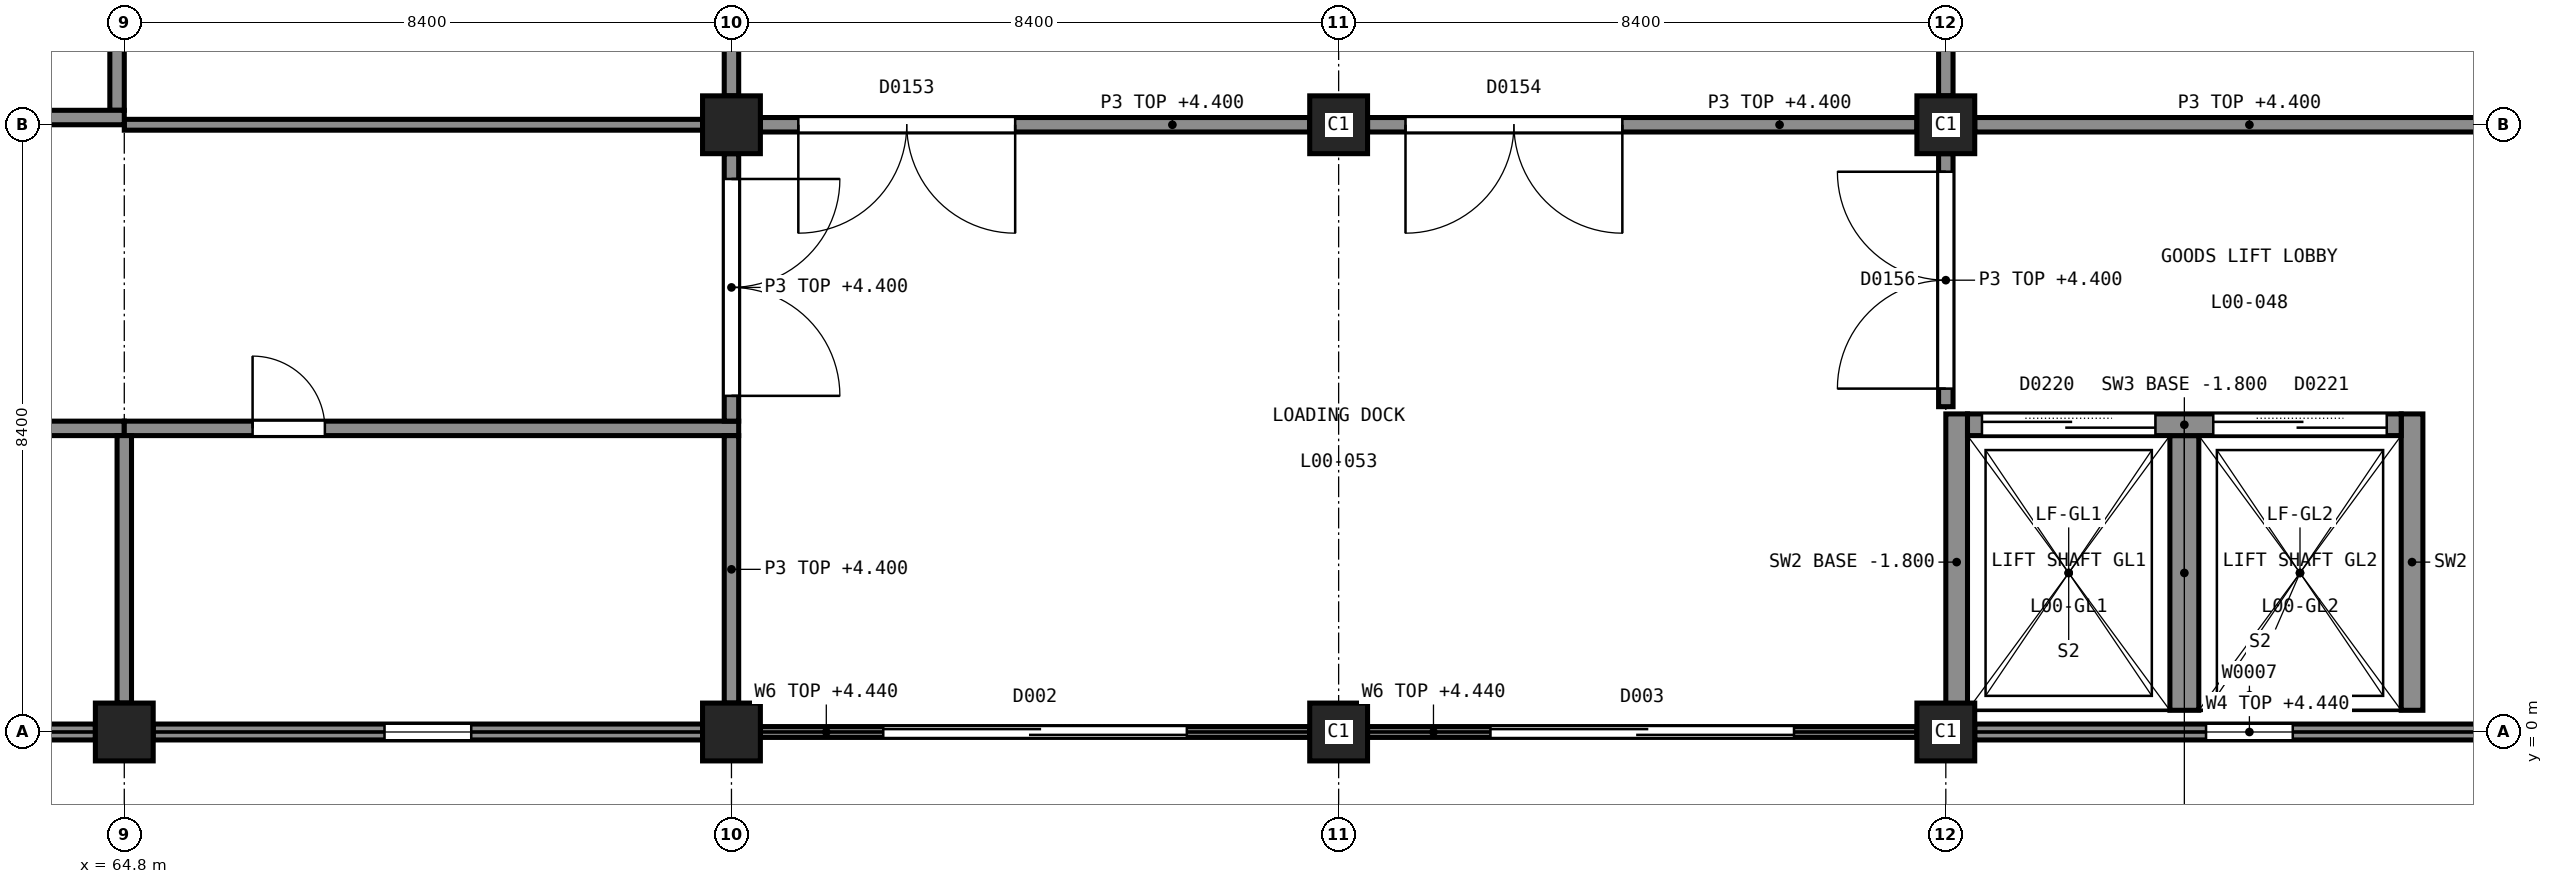
"""IFC4 building model, lengths in metres.
Left out: names, types, materials, properties, quantities, classifications, styles, units other than length and angle.
Written with IfcOpenShell. Run it as: python <this file> out.ifc"""

import sys

from ifc_helpers import new_model, si_unit, direction, frame, frame_2d, origin, origin_2d, place, context, subcontext, project, spatial, rectangle, extrude, element, fill, save


model = new_model("IFC4")
c1 = context("Model", 3, precision=1e-05, world=origin(), true_north=direction((0.0, 1.0)))
c2 = subcontext(c1, "Body", "Model", "MODEL_VIEW")
j1 = project(units=[si_unit("LENGTHUNIT", "METRE"), si_unit("PLANEANGLEUNIT", "RADIAN")], contexts=[c1])
p1 = place(None, origin())
s1 = spatial("IfcSite", under=j1, at=p1, CompositionType="ELEMENT")
p2 = place(p1, origin())
s2 = spatial("IfcBuilding", under=s1, at=p2, CompositionType="ELEMENT")
p3 = place(p2, origin())
s3 = spatial("IfcBuildingStorey", under=s2, at=p3, CompositionType="ELEMENT", Elevation=0.0)
p4 = place(p3, frame((56.4, 8.5, -1.8), z_axis=(0.0, 0.0, 1.0), x_axis=(1.0, 0.0, 0.0)))
e1 = element("IfcWall", 1, at=p4, inside=s3, PredefinedType="SHEAR", context=c2, shape_type="SweptSolid", body=[
    extrude(rectangle(XDim=8.4, YDim=0.2, at=frame_2d((4.2, 0.0))), origin(), (0.0, 0.0, 1.0), 7.3),
])
p5 = place(p4, frame((3.3, 0.0, 1.8)))
e2 = element("IfcOpeningElement", 2, at=p5, cuts=e1, PredefinedType="OPENING", context=c2, shape_type="SweptSolid", body=[
    extrude(rectangle(XDim=1.8, YDim=2.1, at=frame_2d((0.9, 1.05))), frame((0.0, 0.11, 0.0), z_axis=(0.0, -1.0, 0.0), x_axis=(1.0, 0.0, 0.0)), (0.0, 0.0, 1.0), 0.22),
])
p6 = place(p3, frame((64.7, 8.6, -1.8), z_axis=(0.0, 0.0, 1.0), x_axis=(0.0, 1.0, 0.0)))
e3 = element("IfcWall", 3, at=p6, inside=s3, PredefinedType="SHEAR", context=c2, shape_type="SweptSolid", body=[
    extrude(rectangle(XDim=8.0, YDim=0.2, at=frame_2d((4.0, 0.0))), origin(), (0.0, 0.0, 1.0), 7.3),
])
for number, where, z_axis, x_axis in (
    (4, (90.15, 0.3, -1.8), (0.0, 0.0, 1.0), (0.0, 1.0, 0.0)),
    (5, (96.45, 0.3, -1.8), (0.0, 0.0, 1.0), (0.0, 1.0, 0.0)),
):
    element("IfcWall", number, at=place(p3, frame(where, z_axis=z_axis, x_axis=x_axis)), inside=s3, PredefinedType="SHEAR", context=c2, shape_type="SweptSolid", body=[
        extrude(rectangle(XDim=4.1, YDim=0.3, at=frame_2d((2.05, 0.0))), origin(), (0.0, 0.0, 1.0), 7.3),
    ])
p7 = place(p3, frame((90.3, 4.25, -1.8), z_axis=(0.0, 0.0, 1.0), x_axis=(1.0, 0.0, 0.0)))
e6 = element("IfcWall", 6, at=p7, inside=s3, PredefinedType="SHEAR", context=c2, shape_type="SweptSolid", body=[
    extrude(rectangle(XDim=6.0, YDim=0.3, at=frame_2d((3.0, 0.0))), origin(), (0.0, 0.0, 1.0), 7.3),
])
p8 = place(p7, frame((0.2, 0.0, 1.8)))
e7 = element("IfcOpeningElement", 7, at=p8, cuts=e6, PredefinedType="OPENING", context=c2, shape_type="SweptSolid", body=[
    extrude(rectangle(XDim=2.4, YDim=2.4, at=frame_2d((1.2, 1.2))), frame((0.0, 0.16, 0.0), z_axis=(0.0, -1.0, 0.0), x_axis=(1.0, 0.0, 0.0)), (0.0, 0.0, 1.0), 0.32),
])
p9 = place(p7, frame((3.4, 0.0, 1.8)))
e8 = element("IfcOpeningElement", 8, at=p9, cuts=e6, PredefinedType="OPENING", context=c2, shape_type="SweptSolid", body=[
    extrude(rectangle(XDim=2.4, YDim=2.4, at=frame_2d((1.2, 1.2))), frame((0.0, 0.16, 0.0), z_axis=(0.0, -1.0, 0.0), x_axis=(1.0, 0.0, 0.0)), (0.0, 0.0, 1.0), 0.32),
])
p10 = place(p3, frame((93.3, 0.3, -1.8), z_axis=(0.0, 0.0, 1.0), x_axis=(0.0, 1.0, 0.0)))
e9 = element("IfcWall", 9, at=p10, inside=s3, PredefinedType="SHEAR", context=c2, shape_type="SweptSolid", body=[
    extrude(rectangle(XDim=3.8, YDim=0.4, at=frame_2d((1.9, 0.0))), origin(), (0.0, 0.0, 1.0), 7.3),
])
for number, where, z_axis, x_axis in (
    (10, (64.8, 0.0, -0.3), (0.0, 0.0, 1.0), (1.0, 0.0, 0.0)),
    (11, (73.2, 0.0, -0.3), (0.0, 0.0, 1.0), (1.0, 0.0, 0.0)),
    (12, (73.2, 8.4, -0.3), (0.0, 0.0, 1.0), (1.0, 0.0, 0.0)),
    (13, (81.6, 0.0, -0.3), (0.0, 0.0, 1.0), (1.0, 0.0, 0.0)),
    (14, (81.6, 8.4, -0.3), (0.0, 0.0, 1.0), (1.0, 0.0, 0.0)),
    (15, (90.0, 0.0, -0.3), (0.0, 0.0, 1.0), (1.0, 0.0, 0.0)),
    (16, (90.0, 8.4, -0.3), (0.0, 0.0, 1.0), (1.0, 0.0, 0.0)),
):
    element("IfcColumn", number, at=place(p3, frame(where, z_axis=z_axis, x_axis=x_axis)), inside=s3, PredefinedType="COLUMN", context=c2, shape_type="SweptSolid", body=[
        extrude(rectangle(XDim=0.8, YDim=0.8, at=origin_2d()), origin(), (0.0, 0.0, 1.0), 5.8),
    ])
p11 = place(p3, frame((56.8, 0.0, 0.0), z_axis=(0.0, 0.0, 1.0), x_axis=(1.0, 0.0, 0.0)))
e17 = element("IfcWall", 17, at=p11, inside=s3, PredefinedType="SOLIDWALL", context=c2, shape_type="SweptSolid", body=[
    extrude(rectangle(XDim=7.6, YDim=0.22, at=frame_2d((3.8, 0.0))), origin(), (0.0, 0.0, 1.0), 4.44),
])
p12 = place(p11, frame((3.2, 0.0, 2.1)))
e18 = element("IfcOpeningElement", 18, at=p12, cuts=e17, PredefinedType="OPENING", context=c2, shape_type="SweptSolid", body=[
    extrude(rectangle(XDim=1.2, YDim=0.6, at=frame_2d((0.6, 0.3))), frame((0.0, 0.12, 0.0), z_axis=(0.0, -1.0, 0.0), x_axis=(1.0, 0.0, 0.0)), (0.0, 0.0, 1.0), 0.24),
])
p13 = place(p3, frame((65.2, 0.0, 0.0), z_axis=(0.0, 0.0, 1.0), x_axis=(1.0, 0.0, 0.0)))
e19 = element("IfcWall", 19, at=p13, inside=s3, PredefinedType="SOLIDWALL", context=c2, shape_type="SweptSolid", body=[
    extrude(rectangle(XDim=7.6, YDim=0.22, at=frame_2d((3.8, 0.0))), origin(), (0.0, 0.0, 1.0), 4.44),
])
p14 = place(p13, frame((3.2, 0.0, 2.1)))
e20 = element("IfcOpeningElement", 20, at=p14, cuts=e19, PredefinedType="OPENING", context=c2, shape_type="SweptSolid", body=[
    extrude(rectangle(XDim=1.2, YDim=0.6, at=frame_2d((0.6, 0.3))), frame((0.0, 0.12, 0.0), z_axis=(0.0, -1.0, 0.0), x_axis=(1.0, 0.0, 0.0)), (0.0, 0.0, 1.0), 0.24),
])
p15 = place(p3, frame((73.6, 0.0, 0.0), z_axis=(0.0, 0.0, 1.0), x_axis=(1.0, 0.0, 0.0)))
e21 = element("IfcWall", 21, at=p15, inside=s3, PredefinedType="ELEMENTEDWALL", context=c2, shape_type="SweptSolid", body=[
    extrude(rectangle(XDim=7.6, YDim=0.15, at=frame_2d((3.8, 0.0))), origin(), (0.0, 0.0, 1.0), 4.44),
])
p16 = place(p15, frame((1.7, 0.0, 0.0)))
e22 = element("IfcOpeningElement", 22, at=p16, cuts=e21, PredefinedType="OPENING", context=c2, shape_type="SweptSolid", body=[
    extrude(rectangle(XDim=4.2, YDim=4.34, at=frame_2d((2.1, 2.17))), frame((0.0, 0.085, 0.0), z_axis=(0.0, -1.0, 0.0), x_axis=(1.0, 0.0, 0.0)), (0.0, 0.0, 1.0), 0.17),
])
p17 = place(p3, frame((82.0, 0.0, 0.0), z_axis=(0.0, 0.0, 1.0), x_axis=(1.0, 0.0, 0.0)))
e23 = element("IfcWall", 23, at=p17, inside=s3, PredefinedType="ELEMENTEDWALL", context=c2, shape_type="SweptSolid", body=[
    extrude(rectangle(XDim=7.6, YDim=0.15, at=frame_2d((3.8, 0.0))), origin(), (0.0, 0.0, 1.0), 4.44),
])
p18 = place(p17, frame((1.7, 0.0, 0.0)))
e24 = element("IfcOpeningElement", 24, at=p18, cuts=e23, PredefinedType="OPENING", context=c2, shape_type="SweptSolid", body=[
    extrude(rectangle(XDim=4.2, YDim=4.34, at=frame_2d((2.1, 2.17))), frame((0.0, 0.085, 0.0), z_axis=(0.0, -1.0, 0.0), x_axis=(1.0, 0.0, 0.0)), (0.0, 0.0, 1.0), 0.17),
])
p19 = place(p3, frame((90.4, 0.0, 0.0), z_axis=(0.0, 0.0, 1.0), x_axis=(1.0, 0.0, 0.0)))
e25 = element("IfcWall", 25, at=p19, inside=s3, PredefinedType="SOLIDWALL", context=c2, shape_type="SweptSolid", body=[
    extrude(rectangle(XDim=7.6, YDim=0.22, at=frame_2d((3.8, 0.0))), origin(), (0.0, 0.0, 1.0), 4.44),
])
p20 = place(p19, frame((3.2, 0.0, 2.1)))
e26 = element("IfcOpeningElement", 26, at=p20, cuts=e25, PredefinedType="OPENING", context=c2, shape_type="SweptSolid", body=[
    extrude(rectangle(XDim=1.2, YDim=0.6, at=frame_2d((0.6, 0.3))), frame((0.0, 0.12, 0.0), z_axis=(0.0, -1.0, 0.0), x_axis=(1.0, 0.0, 0.0)), (0.0, 0.0, 1.0), 0.24),
])
p21 = place(p3, frame((73.2, 8.8, 0.0), z_axis=(0.0, 0.0, 1.0), x_axis=(0.0, 1.0, 0.0)))
e27 = element("IfcWall", 27, at=p21, inside=s3, PredefinedType="PARTITIONING", context=c2, shape_type="SweptSolid", body=[
    extrude(rectangle(XDim=7.6, YDim=0.2, at=frame_2d((3.8, 0.0))), origin(), (0.0, 0.0, 1.0), 4.4),
])
p22 = place(p21, frame((4.075, 0.0, 0.0)))
e28 = element("IfcOpeningElement", 28, at=p22, cuts=e27, PredefinedType="OPENING", context=c2, shape_type="SweptSolid", body=[
    extrude(rectangle(XDim=3.0, YDim=3.0, at=frame_2d((1.5, 1.5))), frame((0.0, 0.11, 0.0), z_axis=(0.0, -1.0, 0.0), x_axis=(1.0, 0.0, 0.0)), (0.0, 0.0, 1.0), 0.22),
])
p23 = place(p3, frame((64.8, 8.4, 0.0), z_axis=(0.0, 0.0, 1.0), x_axis=(1.0, 0.0, 0.0)))
e29 = element("IfcWall", 29, at=p23, inside=s3, PredefinedType="PARTITIONING", context=c2, shape_type="SweptSolid", body=[
    extrude(rectangle(XDim=8.0, YDim=0.15, at=frame_2d((4.0, 0.0))), origin(), (0.0, 0.0, 1.0), 4.4),
])
p24 = place(p3, frame((90.0, 8.8, 0.0), z_axis=(0.0, 0.0, 1.0), x_axis=(0.0, 1.0, 0.0)))
e30 = element("IfcWall", 30, at=p24, inside=s3, PredefinedType="PARTITIONING", context=c2, shape_type="SweptSolid", body=[
    extrude(rectangle(XDim=7.6, YDim=0.2, at=frame_2d((3.8, 0.0))), origin(), (0.0, 0.0, 1.0), 4.4),
])
p25 = place(p24, frame((4.075, 0.0, 0.0)))
e31 = element("IfcOpeningElement", 31, at=p25, cuts=e30, PredefinedType="OPENING", context=c2, shape_type="SweptSolid", body=[
    extrude(rectangle(XDim=3.0, YDim=3.0, at=frame_2d((1.5, 1.5))), frame((0.0, 0.11, 0.0), z_axis=(0.0, -1.0, 0.0), x_axis=(1.0, 0.0, 0.0)), (0.0, 0.0, 1.0), 0.22),
])
p26 = place(p3, frame((73.6, 8.4, 0.0), z_axis=(0.0, 0.0, 1.0), x_axis=(1.0, 0.0, 0.0)))
e32 = element("IfcWall", 32, at=p26, inside=s3, PredefinedType="PARTITIONING", context=c2, shape_type="SweptSolid", body=[
    extrude(rectangle(XDim=7.6, YDim=0.2, at=frame_2d((3.8, 0.0))), origin(), (0.0, 0.0, 1.0), 4.4),
])
p27 = place(p26, frame((0.525, 0.0, 0.0)))
e33 = element("IfcOpeningElement", 33, at=p27, cuts=e32, PredefinedType="OPENING", context=c2, shape_type="SweptSolid", body=[
    extrude(rectangle(XDim=3.0, YDim=3.0, at=frame_2d((1.5, 1.5))), frame((0.0, 0.11, 0.0), z_axis=(0.0, -1.0, 0.0), x_axis=(1.0, 0.0, 0.0)), (0.0, 0.0, 1.0), 0.22),
])
p28 = place(p3, frame((82.0, 8.4, 0.0), z_axis=(0.0, 0.0, 1.0), x_axis=(1.0, 0.0, 0.0)))
e34 = element("IfcWall", 34, at=p28, inside=s3, PredefinedType="PARTITIONING", context=c2, shape_type="SweptSolid", body=[
    extrude(rectangle(XDim=7.6, YDim=0.2, at=frame_2d((3.8, 0.0))), origin(), (0.0, 0.0, 1.0), 4.4),
])
p29 = place(p28, frame((0.525, 0.0, 0.0)))
e35 = element("IfcOpeningElement", 35, at=p29, cuts=e34, PredefinedType="OPENING", context=c2, shape_type="SweptSolid", body=[
    extrude(rectangle(XDim=3.0, YDim=3.0, at=frame_2d((1.5, 1.5))), frame((0.0, 0.11, 0.0), z_axis=(0.0, -1.0, 0.0), x_axis=(1.0, 0.0, 0.0)), (0.0, 0.0, 1.0), 0.22),
])
p30 = place(p3, frame((90.4, 8.4, 0.0), z_axis=(0.0, 0.0, 1.0), x_axis=(1.0, 0.0, 0.0)))
e36 = element("IfcWall", 36, at=p30, inside=s3, PredefinedType="PARTITIONING", context=c2, shape_type="SweptSolid", body=[
    extrude(rectangle(XDim=7.6, YDim=0.2, at=frame_2d((3.8, 0.0))), origin(), (0.0, 0.0, 1.0), 4.4),
])
p31 = place(p3, frame((56.3, 4.2, 0.0), z_axis=(0.0, 0.0, 1.0), x_axis=(1.0, 0.0, 0.0)))
e37 = element("IfcWall", 37, at=p31, inside=s3, PredefinedType="PARTITIONING", context=c2, shape_type="SweptSolid", body=[
    extrude(rectangle(XDim=8.5, YDim=0.2, at=frame_2d((4.25, 0.0))), origin(), (0.0, 0.0, 1.0), 4.4),
])
p32 = place(p31, frame((1.875, 0.0, 0.0)))
e38 = element("IfcOpeningElement", 38, at=p32, cuts=e37, PredefinedType="OPENING", context=c2, shape_type="SweptSolid", body=[
    extrude(rectangle(XDim=1.0, YDim=2.1, at=frame_2d((0.5, 1.05))), frame((0.0, 0.11, 0.0), z_axis=(0.0, -1.0, 0.0), x_axis=(1.0, 0.0, 0.0)), (0.0, 0.0, 1.0), 0.22),
])
p33 = place(p3, frame((64.8, 4.2, 0.0), z_axis=(0.0, 0.0, 1.0), x_axis=(1.0, 0.0, 0.0)))
e39 = element("IfcWall", 39, at=p33, inside=s3, PredefinedType="PARTITIONING", context=c2, shape_type="SweptSolid", body=[
    extrude(rectangle(XDim=8.5, YDim=0.2, at=frame_2d((4.25, 0.0))), origin(), (0.0, 0.0, 1.0), 4.4),
])
p34 = place(p33, frame((1.775, 0.0, 0.0)))
e40 = element("IfcOpeningElement", 40, at=p34, cuts=e39, PredefinedType="OPENING", context=c2, shape_type="SweptSolid", body=[
    extrude(rectangle(XDim=1.0, YDim=2.1, at=frame_2d((0.5, 1.05))), frame((0.0, 0.11, 0.0), z_axis=(0.0, -1.0, 0.0), x_axis=(1.0, 0.0, 0.0)), (0.0, 0.0, 1.0), 0.22),
])
p35 = place(p3, frame((73.2, 4.3, 0.0), z_axis=(0.0, 0.0, 1.0), x_axis=(0.0, 1.0, 0.0)))
e41 = element("IfcWall", 41, at=p35, inside=s3, PredefinedType="PARTITIONING", context=c2, shape_type="SweptSolid", body=[
    extrude(rectangle(XDim=3.7, YDim=0.2, at=frame_2d((1.85, 0.0))), origin(), (0.0, 0.0, 1.0), 4.4),
])
p36 = place(p35, frame((0.35, 0.0, 0.0)))
e42 = element("IfcOpeningElement", 42, at=p36, cuts=e41, PredefinedType="OPENING", context=c2, shape_type="SweptSolid", body=[
    extrude(rectangle(XDim=3.0, YDim=3.0, at=frame_2d((1.5, 1.5))), frame((0.0, 0.11, 0.0), z_axis=(0.0, -1.0, 0.0), x_axis=(1.0, 0.0, 0.0)), (0.0, 0.0, 1.0), 0.22),
])
p37 = place(p3, frame((90.0, 4.5, 0.0), z_axis=(0.0, 0.0, 1.0), x_axis=(0.0, 1.0, 0.0)))
e43 = element("IfcWall", 43, at=p37, inside=s3, PredefinedType="PARTITIONING", context=c2, shape_type="SweptSolid", body=[
    extrude(rectangle(XDim=3.5, YDim=0.2, at=frame_2d((1.75, 0.0))), origin(), (0.0, 0.0, 1.0), 4.4),
])
p38 = place(p37, frame((0.25, 0.0, 0.0)))
e44 = element("IfcOpeningElement", 44, at=p38, cuts=e43, PredefinedType="OPENING", context=c2, shape_type="SweptSolid", body=[
    extrude(rectangle(XDim=3.0, YDim=3.0, at=frame_2d((1.5, 1.5))), frame((0.0, 0.11, 0.0), z_axis=(0.0, -1.0, 0.0), x_axis=(1.0, 0.0, 0.0)), (0.0, 0.0, 1.0), 0.22),
])
for number, where, z_axis, x_axis in (
    (45, (64.8, 0.4, 0.0), (0.0, 0.0, 1.0), (0.0, 1.0, 0.0)),
    (46, (73.2, 0.4, 0.0), (0.0, 0.0, 1.0), (0.0, 1.0, 0.0)),
):
    element("IfcWall", number, at=place(p3, frame(where, z_axis=z_axis, x_axis=x_axis)), inside=s3, PredefinedType="PARTITIONING", context=c2, shape_type="SweptSolid", body=[
        extrude(rectangle(XDim=3.7, YDim=0.2, at=frame_2d((1.85, 0.0))), origin(), (0.0, 0.0, 1.0), 4.4),
    ])
p39 = place(p14, origin())
e47 = element("IfcWindow", 47, at=p39, inside=s3, PartitioningType="SINGLE_PANEL", PredefinedType="WINDOW", context=c2, shape_type="SweptSolid", body=[
    extrude(rectangle(XDim=1.2, YDim=0.6, at=frame_2d((0.6, 0.3))), frame((0.0, 0.09, 0.0), z_axis=(0.0, -1.0, 0.0), x_axis=(1.0, 0.0, 0.0)), (0.0, 0.0, 1.0), 0.06),
])
fill(e20, e47)
p40 = place(p16, origin())
e48 = element("IfcDoor", 48, at=p40, inside=s3, OperationType="ROLLINGUP", PredefinedType="DOOR", context=c2, shape_type="SweptSolid", body=[
    extrude(rectangle(XDim=4.2, YDim=4.34, at=frame_2d((2.1, 2.17))), frame((0.0, 0.025, 0.0), z_axis=(0.0, -1.0, 0.0), x_axis=(1.0, 0.0, 0.0)), (0.0, 0.0, 1.0), 0.05),
])
fill(e22, e48)
p41 = place(p18, origin())
e49 = element("IfcDoor", 49, at=p41, inside=s3, OperationType="ROLLINGUP", PredefinedType="DOOR", context=c2, shape_type="SweptSolid", body=[
    extrude(rectangle(XDim=4.2, YDim=4.34, at=frame_2d((2.1, 2.17))), frame((0.0, 0.025, 0.0), z_axis=(0.0, -1.0, 0.0), x_axis=(1.0, 0.0, 0.0)), (0.0, 0.0, 1.0), 0.05),
])
fill(e24, e49)
p42 = place(p20, origin())
e50 = element("IfcWindow", 50, at=p42, inside=s3, PartitioningType="SINGLE_PANEL", PredefinedType="WINDOW", context=c2, shape_type="SweptSolid", body=[
    extrude(rectangle(XDim=1.2, YDim=0.6, at=frame_2d((0.6, 0.3))), frame((0.0, 0.09, 0.0), z_axis=(0.0, -1.0, 0.0), x_axis=(1.0, 0.0, 0.0)), (0.0, 0.0, 1.0), 0.06),
])
fill(e26, e50)
p43 = place(p34, origin())
e51 = element("IfcDoor", 51, at=p43, inside=s3, OperationType="SINGLE_SWING_RIGHT", PredefinedType="DOOR", context=c2, shape_type="SweptSolid", body=[
    extrude(rectangle(XDim=1.0, YDim=2.1, at=frame_2d((0.5, 1.05))), frame((0.0, 0.025, 0.0), z_axis=(0.0, -1.0, 0.0), x_axis=(1.0, 0.0, 0.0)), (0.0, 0.0, 1.0), 0.05),
])
fill(e40, e51)
p44 = place(p27, origin())
e52 = element("IfcDoor", 52, at=p44, inside=s3, OperationType="DOUBLE_DOOR_SINGLE_SWING", PredefinedType="DOOR", context=c2, shape_type="SweptSolid", body=[
    extrude(rectangle(XDim=3.0, YDim=3.0, at=frame_2d((1.5, 1.5))), frame((0.0, 0.025, 0.0), z_axis=(0.0, -1.0, 0.0), x_axis=(1.0, 0.0, 0.0)), (0.0, 0.0, 1.0), 0.05),
])
fill(e33, e52)
p45 = place(p29, origin())
e53 = element("IfcDoor", 53, at=p45, inside=s3, OperationType="DOUBLE_DOOR_SINGLE_SWING", PredefinedType="DOOR", context=c2, shape_type="SweptSolid", body=[
    extrude(rectangle(XDim=3.0, YDim=3.0, at=frame_2d((1.5, 1.5))), frame((0.0, 0.025, 0.0), z_axis=(0.0, -1.0, 0.0), x_axis=(1.0, 0.0, 0.0)), (0.0, 0.0, 1.0), 0.05),
])
fill(e35, e53)
p46 = place(p36, origin())
e54 = element("IfcDoor", 54, at=p46, inside=s3, OperationType="DOUBLE_DOOR_SINGLE_SWING", PredefinedType="DOOR", context=c2, shape_type="SweptSolid", body=[
    extrude(rectangle(XDim=3.0, YDim=3.0, at=frame_2d((1.5, 1.5))), frame((0.0, 0.025, 0.0), z_axis=(0.0, -1.0, 0.0), x_axis=(1.0, 0.0, 0.0)), (0.0, 0.0, 1.0), 0.05),
])
fill(e42, e54)
p47 = place(p38, origin())
e55 = element("IfcDoor", 55, at=p47, inside=s3, OperationType="DOUBLE_DOOR_SINGLE_SWING", PredefinedType="DOOR", context=c2, shape_type="SweptSolid", body=[
    extrude(rectangle(XDim=3.0, YDim=3.0, at=frame_2d((1.5, 1.5))), frame((0.0, 0.025, 0.0), z_axis=(0.0, -1.0, 0.0), x_axis=(1.0, 0.0, 0.0)), (0.0, 0.0, 1.0), 0.05),
])
fill(e44, e55)
p48 = place(p8, origin())
e56 = element("IfcDoor", 56, at=p48, inside=s3, OperationType="DOUBLE_DOOR_SLIDING", PredefinedType="DOOR", context=c2, shape_type="SweptSolid", body=[
    extrude(rectangle(XDim=2.4, YDim=2.4, at=frame_2d((1.2, 1.2))), frame((0.0, 0.025, 0.0), z_axis=(0.0, -1.0, 0.0), x_axis=(1.0, 0.0, 0.0)), (0.0, 0.0, 1.0), 0.05),
])
fill(e7, e56)
p49 = place(p9, origin())
e57 = element("IfcDoor", 57, at=p49, inside=s3, OperationType="DOUBLE_DOOR_SLIDING", PredefinedType="DOOR", context=c2, shape_type="SweptSolid", body=[
    extrude(rectangle(XDim=2.4, YDim=2.4, at=frame_2d((1.2, 1.2))), frame((0.0, 0.025, 0.0), z_axis=(0.0, -1.0, 0.0), x_axis=(1.0, 0.0, 0.0)), (0.0, 0.0, 1.0), 0.05),
])
fill(e8, e57)
save(model, sys.argv[1])
